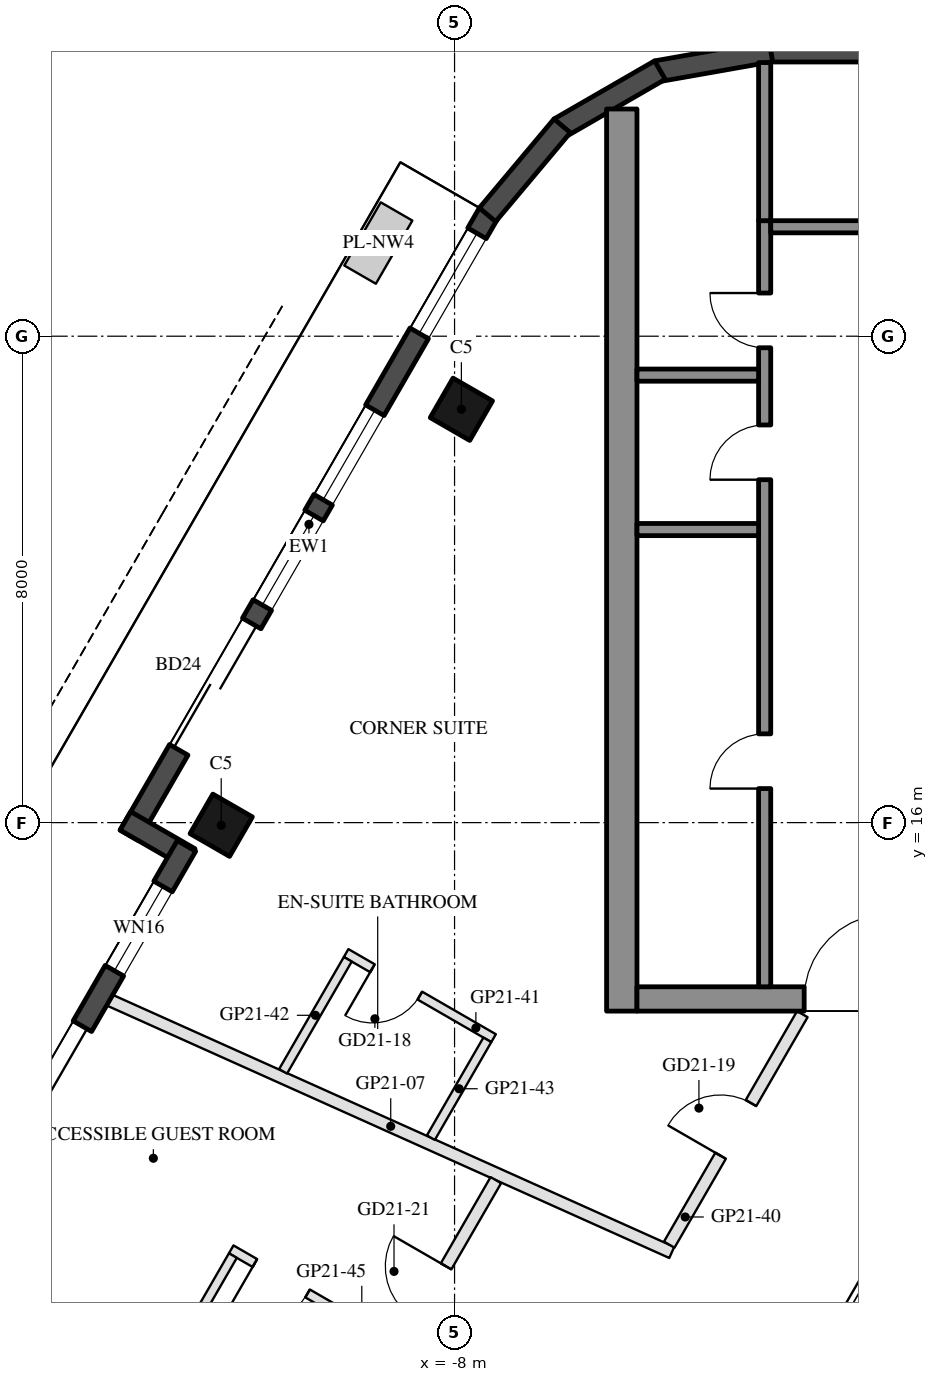
"""IFC4 building model, lengths in metres.
Left out: names, types, materials, properties, quantities, classifications, styles, units other than length and angle.
Written with IfcOpenShell. Run it as: python <this file> out.ifc"""

import sys

from ifc_helpers import new_model, si_unit, direction, frame, frame_2d, origin, origin_2d, place, context, subcontext, project, spatial, rectangle, hollow_rectangle, extrude, element, fill, save


model = new_model("IFC4")
c1 = context("Model", 3, precision=1e-05, world=origin(), true_north=direction((0.0, 1.0)))
c2 = subcontext(c1, "Body", "Model", "MODEL_VIEW")
j1 = project(units=[si_unit("LENGTHUNIT", "METRE"), si_unit("PLANEANGLEUNIT", "RADIAN")], contexts=[c1])
p1 = place(None, origin())
s1 = spatial("IfcSite", under=j1, at=p1, CompositionType="ELEMENT")
p2 = place(p1, origin())
s2 = spatial("IfcBuilding", under=s1, at=p2, CompositionType="ELEMENT")
p3 = place(p2, frame((0.0, 0.0, 220.6)))
s3 = spatial("IfcBuildingStorey", under=s2, at=p3, CompositionType="ELEMENT", Elevation=220.6)
for number, where, z_axis, x_axis in (
    (1, (-7.888, 22.798, 0.0), (0.0, 0.0, 1.0), (0.5, 0.866, 0.0)),
    (2, (-11.838, 15.957, 0.0), (0.0, 0.0, 1.0), (0.5, 0.866, 0.0)),
):
    element("IfcColumn", number, at=place(p3, frame(where, z_axis=z_axis, x_axis=x_axis)), inside=s3, PredefinedType="COLUMN", context=c2, shape_type="SweptSolid", body=[
        extrude(hollow_rectangle(XDim=0.75, YDim=0.75, WallThickness=0.035, at=origin_2d()), origin(), (0.0, 0.0, 1.0), 3.7),
    ])
p4 = place(p3, frame((-7.441, 26.022, 0.0), z_axis=(0.0, 0.0, 1.0), x_axis=(-0.499992533062, -0.86602971478, 0.0)))
e3 = element("IfcWall", 3, at=p4, inside=s3, PredefinedType="SOLIDWALL", context=c2, shape_type="SweptSolid", body=[
    extrude(rectangle(XDim=11.816, YDim=0.35, at=frame_2d((5.908, 0.0))), origin(), (0.0, 0.0, 1.0), 3.55),
])
p5 = place(p4, frame((0.381, 0.0, 0.3)))
e4 = element("IfcOpeningElement", 4, at=p5, cuts=e3, PredefinedType="OPENING", context=c2, shape_type="SweptSolid", body=[
    extrude(rectangle(XDim=1.9, YDim=2.65, at=frame_2d((0.95, 1.325))), frame((0.0, 0.185, 0.0), z_axis=(0.0, -1.0, 0.0), x_axis=(1.0, 0.0, 0.0)), (0.0, 0.0, 1.0), 0.37),
])
p6 = place(p4, frame((7.791, 0.0, 0.0)))
e5 = element("IfcOpeningElement", 5, at=p6, cuts=e3, PredefinedType="OPENING", context=c2, shape_type="SweptSolid", body=[
    extrude(rectangle(XDim=2.4, YDim=2.4, at=frame_2d((1.2, 1.2))), frame((0.0, 0.185, 0.0), z_axis=(0.0, -1.0, 0.0), x_axis=(1.0, 0.0, 0.0)), (0.0, 0.0, 1.0), 0.37),
])
p7 = place(p4, frame((3.741, 0.0, 0.3)))
e6 = element("IfcOpeningElement", 6, at=p7, cuts=e3, PredefinedType="OPENING", context=c2, shape_type="SweptSolid", body=[
    extrude(rectangle(XDim=1.7, YDim=2.65, at=frame_2d((0.85, 1.325))), frame((0.0, 0.185, 0.0), z_axis=(0.0, -1.0, 0.0), x_axis=(1.0, 0.0, 0.0)), (0.0, 0.0, 1.0), 0.37),
])
p8 = place(p4, frame((5.741, 0.0, 0.3)))
e7 = element("IfcOpeningElement", 7, at=p8, cuts=e3, PredefinedType="OPENING", context=c2, shape_type="SweptSolid", body=[
    extrude(rectangle(XDim=1.7, YDim=2.65, at=frame_2d((0.85, 1.325))), frame((0.0, 0.185, 0.0), z_axis=(0.0, -1.0, 0.0), x_axis=(1.0, 0.0, 0.0)), (0.0, 0.0, 1.0), 0.37),
])
p9 = place(p3, frame((-13.413, 16.029, 0.0), z_axis=(0.0, 0.0, 1.0), x_axis=(0.866005645448, -0.500034220881, 0.0)))
e8 = element("IfcWall", 8, at=p9, inside=s3, PredefinedType="SOLIDWALL", context=c2, shape_type="SweptSolid", body=[
    extrude(rectangle(XDim=1.22, YDim=0.35, at=frame_2d((0.61, 0.0))), origin(), (0.0, 0.0, 1.0), 3.55),
])
p10 = place(p3, frame((-12.409, 15.617, 0.0), z_axis=(0.0, 0.0, 1.0), x_axis=(-0.500003597184, -0.866023326939, 0.0)))
e9 = element("IfcWall", 9, at=p10, inside=s3, PredefinedType="SOLIDWALL", context=c2, shape_type="SweptSolid", body=[
    extrude(rectangle(XDim=6.74, YDim=0.35, at=frame_2d((3.37, 0.0))), origin(), (0.0, 0.0, 1.0), 3.55),
])
p11 = place(p10, frame((0.77, 0.0, 0.3)))
e10 = element("IfcOpeningElement", 10, at=p11, cuts=e9, PredefinedType="OPENING", context=c2, shape_type="SweptSolid", body=[
    extrude(rectangle(XDim=1.6, YDim=2.65, at=frame_2d((0.8, 1.325))), frame((0.0, 0.185, 0.0), z_axis=(0.0, -1.0, 0.0), x_axis=(1.0, 0.0, 0.0)), (0.0, 0.0, 1.0), 0.37),
])
p12 = place(p10, frame((3.424, 0.0, 0.0)))
e11 = element("IfcOpeningElement", 11, at=p12, cuts=e9, PredefinedType="OPENING", context=c2, shape_type="SweptSolid", body=[
    extrude(rectangle(XDim=2.4, YDim=2.4, at=frame_2d((1.2, 1.2))), frame((0.0, 0.185, 0.0), z_axis=(0.0, -1.0, 0.0), x_axis=(1.0, 0.0, 0.0)), (0.0, 0.0, 1.0), 0.37),
])
p13 = place(p3, frame((2.829, 28.685, 0.0), z_axis=(0.0, 0.0, 1.0), x_axis=(-1.0, 0.0, 0.0)))
e12 = element("IfcWall", 12, at=p13, inside=s3, PredefinedType="SOLIDWALL", context=c2, shape_type="SweptSolid", body=[
    extrude(rectangle(XDim=5.658, YDim=0.35, at=frame_2d((2.829, 0.0))), origin(), (0.0, 0.0, 1.0), 3.55),
])
for number, where, z_axis, x_axis in (
    (13, (-2.799, 28.688, 0.0), (0.0, 0.0, 1.0), (-0.985, -0.174, 0.0)),
    (14, (-4.623, 28.377, 0.0), (0.0, 0.0, 1.0), (-0.866, -0.5, 0.0)),
):
    element("IfcWall", number, at=place(p3, frame(where, z_axis=z_axis, x_axis=x_axis)), inside=s3, PredefinedType="SOLIDWALL", context=c2, shape_type="SweptSolid", body=[
        extrude(rectangle(XDim=1.91, YDim=0.35, at=frame_2d((0.955, 0.0))), origin(), (0.0, 0.0, 1.0), 3.55),
    ])
p14 = place(p3, frame((-6.23, 27.461, 0.0), z_axis=(0.0, 0.0, 1.0), x_axis=(-0.642808304945, -0.766027077259, 0.0)))
e15 = element("IfcWall", 15, at=p14, inside=s3, PredefinedType="SOLIDWALL", context=c2, shape_type="SweptSolid", body=[
    extrude(rectangle(XDim=1.91, YDim=0.35, at=frame_2d((0.955, 0.0))), origin(), (0.0, 0.0, 1.0), 3.55),
])
p15 = place(p3, frame((-5.25, 12.9, 0.0), z_axis=(0.0, 0.0, 1.0), x_axis=(0.0, 1.0, 0.0)))
e16 = element("IfcWall", 16, at=p15, inside=s3, PredefinedType="SHEAR", context=c2, shape_type="SweptSolid", body=[
    extrude(rectangle(XDim=14.837, YDim=0.5, at=frame_2d((7.418, 0.0))), origin(), (0.0, 0.0, 1.0), 3.5),
])
p16 = place(p3, frame((5.0, 13.1, 0.0), z_axis=(0.0, 0.0, 1.0), x_axis=(-1.0, 0.0, 0.0)))
e17 = element("IfcWall", 17, at=p16, inside=s3, PredefinedType="SHEAR", context=c2, shape_type="SweptSolid", body=[
    extrude(rectangle(XDim=10.0, YDim=0.4, at=frame_2d((5.0, 0.0))), origin(), (0.0, 0.0, 1.0), 3.5),
])
p17 = place(p16, frame((3.55, 0.0, 0.0)))
e18 = element("IfcOpeningElement", 18, at=p17, cuts=e17, PredefinedType="OPENING", context=c2, shape_type="SweptSolid", body=[
    extrude(rectangle(XDim=1.1, YDim=2.1, at=frame_2d((0.55, 1.05))), frame((0.0, 0.21, 0.0), z_axis=(0.0, -1.0, 0.0), x_axis=(1.0, 0.0, 0.0)), (0.0, 0.0, 1.0), 0.42),
])
p18 = place(p16, frame((5.85, 0.0, 0.0)))
e19 = element("IfcOpeningElement", 19, at=p18, cuts=e17, PredefinedType="OPENING", context=c2, shape_type="SweptSolid", body=[
    extrude(rectangle(XDim=1.4, YDim=2.1, at=frame_2d((0.7, 1.05))), frame((0.0, 0.21, 0.0), z_axis=(0.0, -1.0, 0.0), x_axis=(1.0, 0.0, 0.0)), (0.0, 0.0, 1.0), 0.42),
])
p19 = place(p3, frame((-2.9, 13.3, 0.0), z_axis=(0.0, 0.0, 1.0), x_axis=(0.0, 1.0, 0.0)))
e20 = element("IfcWall", 20, at=p19, inside=s3, PredefinedType="SHEAR", context=c2, shape_type="SweptSolid", body=[
    extrude(rectangle(XDim=12.6, YDim=0.2, at=frame_2d((6.3, 0.0))), origin(), (0.0, 0.0, 1.0), 3.5),
])
p20 = place(p19, frame((3.26, 0.0, 0.0)))
e21 = element("IfcOpeningElement", 21, at=p20, cuts=e20, PredefinedType="OPENING", context=c2, shape_type="SweptSolid", body=[
    extrude(rectangle(XDim=0.9, YDim=2.1, at=frame_2d((0.45, 1.05))), frame((0.0, 0.11, 0.0), z_axis=(0.0, -1.0, 0.0), x_axis=(1.0, 0.0, 0.0)), (0.0, 0.0, 1.0), 0.22),
])
p21 = place(p19, frame((8.34, 0.0, 0.0)))
e22 = element("IfcOpeningElement", 22, at=p21, cuts=e20, PredefinedType="OPENING", context=c2, shape_type="SweptSolid", body=[
    extrude(rectangle(XDim=0.9, YDim=2.1, at=frame_2d((0.45, 1.05))), frame((0.0, 0.11, 0.0), z_axis=(0.0, -1.0, 0.0), x_axis=(1.0, 0.0, 0.0)), (0.0, 0.0, 1.0), 0.22),
])
p22 = place(p19, frame((10.51, 0.0, 0.0)))
e23 = element("IfcOpeningElement", 23, at=p22, cuts=e20, PredefinedType="OPENING", context=c2, shape_type="SweptSolid", body=[
    extrude(rectangle(XDim=0.9, YDim=2.1, at=frame_2d((0.45, 1.05))), frame((0.0, 0.11, 0.0), z_axis=(0.0, -1.0, 0.0), x_axis=(1.0, 0.0, 0.0)), (0.0, 0.0, 1.0), 0.22),
])
p23 = place(p3, frame((-0.4, 25.8, 0.0), z_axis=(0.0, 0.0, 1.0), x_axis=(-1.0, 0.0, 0.0)))
e24 = element("IfcWall", 24, at=p23, inside=s3, PredefinedType="SHEAR", context=c2, shape_type="SweptSolid", body=[
    extrude(rectangle(XDim=2.4, YDim=0.2, at=frame_2d((1.2, 0.0))), origin(), (0.0, 0.0, 1.0), 3.5),
])
for number, where, z_axis, x_axis in (
    (25, (-3.0, 20.82, 0.0), (0.0, 0.0, 1.0), (-1.0, 0.0, 0.0)),
    (26, (-3.0, 23.36, 0.0), (0.0, 0.0, 1.0), (-1.0, 0.0, 0.0)),
):
    element("IfcWall", number, at=place(p3, frame(where, z_axis=z_axis, x_axis=x_axis)), inside=s3, PredefinedType="SHEAR", context=c2, shape_type="SweptSolid", body=[
        extrude(rectangle(XDim=2.0, YDim=0.2, at=frame_2d((1.0, 0.0))), origin(), (0.0, 0.0, 1.0), 3.5),
    ])
p24 = place(p3, frame((-2.9, 25.9, 0.0), z_axis=(0.0, 0.0, 1.0), x_axis=(0.0, 1.0, 0.0)))
e27 = element("IfcWall", 27, at=p24, inside=s3, PredefinedType="SHEAR", context=c2, shape_type="SweptSolid", body=[
    extrude(rectangle(XDim=2.6, YDim=0.2, at=frame_2d((1.3, 0.0))), origin(), (0.0, 0.0, 1.0), 3.5),
])
p25 = place(p3, frame((-13.672, 13.08, 0.0), z_axis=(0.0, 0.0, 1.0), x_axis=(0.912311972773, -0.409495866077, 0.0)))
e28 = element("IfcWall", 28, at=p25, inside=s3, PredefinedType="PARTITIONING", context=c2, shape_type="SweptSolid", body=[
    extrude(rectangle(XDim=10.132, YDim=0.2, at=frame_2d((5.066, 0.0))), origin(), (0.0, 0.0, 1.0), 3.06),
])
p26 = place(p3, frame((-17.347, 8.514, 0.0), z_axis=(0.0, 0.0, 1.0), x_axis=(0.879604495132, -0.475705720109, 0.0)))
e29 = element("IfcWall", 29, at=p26, inside=s3, PredefinedType="PARTITIONING", context=c2, shape_type="SweptSolid", body=[
    extrude(rectangle(XDim=7.983, YDim=0.2, at=frame_2d((3.992, 0.0))), origin(), (0.0, 0.0, 1.0), 3.06),
])
p27 = place(p3, frame((-4.469, 9.059, 0.0), z_axis=(0.0, 0.0, 1.0), x_axis=(0.499996027077, 0.86602769754, 0.0)))
e30 = element("IfcWall", 30, at=p27, inside=s3, PredefinedType="PARTITIONING", context=c2, shape_type="SweptSolid", body=[
    extrude(rectangle(XDim=4.377, YDim=0.2, at=frame_2d((2.189, 0.0))), origin(), (0.0, 0.0, 1.0), 2.95),
])
p28 = place(p27, frame((1.689, 0.0, 0.0)))
e31 = element("IfcOpeningElement", 31, at=p28, cuts=e30, PredefinedType="OPENING", context=c2, shape_type="SweptSolid", body=[
    extrude(rectangle(XDim=1.0, YDim=2.1, at=frame_2d((0.5, 1.05))), frame((0.0, 0.11, 0.0), z_axis=(0.0, -1.0, 0.0), x_axis=(1.0, 0.0, 0.0)), (0.0, 0.0, 1.0), 0.22),
])
p29 = place(p3, frame((-7.358, 12.455, 0.0), z_axis=(0.0, 0.0, 1.0), x_axis=(-0.866034573852, 0.49998411664, 0.0)))
e32 = element("IfcWall", 32, at=p29, inside=s3, PredefinedType="PARTITIONING", context=c2, shape_type="SweptSolid", body=[
    extrude(rectangle(XDim=2.8, YDim=0.15, at=frame_2d((1.4, 0.0))), origin(), (0.0, 0.0, 1.0), 3.55),
])
p30 = place(p29, frame((1.4, 0.0, 0.0)))
e33 = element("IfcOpeningElement", 33, at=p30, cuts=e32, PredefinedType="OPENING", context=c2, shape_type="SweptSolid", body=[
    extrude(rectangle(XDim=0.9, YDim=2.1, at=frame_2d((0.45, 1.05))), frame((0.0, 0.085, 0.0), z_axis=(0.0, -1.0, 0.0), x_axis=(1.0, 0.0, 0.0)), (0.0, 0.0, 1.0), 0.17),
])
p31 = place(p3, frame((-9.756, 13.752, 0.0), z_axis=(0.0, 0.0, 1.0), x_axis=(-0.50001378257, -0.866017446268, 0.0)))
e34 = element("IfcWall", 34, at=p31, inside=s3, PredefinedType="PARTITIONING", context=c2, shape_type="SweptSolid", body=[
    extrude(rectangle(XDim=2.128, YDim=0.15, at=frame_2d((1.064, 0.0))), origin(), (0.0, 0.0, 1.0), 3.55),
])
p32 = place(p3, frame((-7.461, 12.427, 0.0), z_axis=(0.0, 0.0, 1.0), x_axis=(-0.500025795397, -0.866010510293, 0.0)))
e35 = element("IfcWall", 35, at=p32, inside=s3, PredefinedType="PARTITIONING", context=c2, shape_type="SweptSolid", body=[
    extrude(rectangle(XDim=1.858, YDim=0.15, at=frame_2d((0.929, 0.0))), origin(), (0.0, 0.0, 1.0), 3.55),
])
p33 = place(p3, frame((-10.363, 4.851, 0.0), z_axis=(0.0, 0.0, 1.0), x_axis=(0.50000147882, 0.866024549986, 0.0)))
e36 = element("IfcWall", 36, at=p33, inside=s3, PredefinedType="PARTITIONING", context=c2, shape_type="SweptSolid", body=[
    extrude(rectangle(XDim=6.084, YDim=0.2, at=frame_2d((3.042, 0.0))), origin(), (0.0, 0.0, 1.0), 2.95),
])
p34 = place(p33, frame((3.447, 0.0, 0.0)))
e37 = element("IfcOpeningElement", 37, at=p34, cuts=e36, PredefinedType="OPENING", context=c2, shape_type="SweptSolid", body=[
    extrude(rectangle(XDim=1.0, YDim=2.1, at=frame_2d((0.5, 1.05))), frame((0.0, 0.11, 0.0), z_axis=(0.0, -1.0, 0.0), x_axis=(1.0, 0.0, 0.0)), (0.0, 0.0, 1.0), 0.22),
])
p35 = place(p3, frame((-8.989, 7.431, 0.0), z_axis=(0.0, 0.0, 1.0), x_axis=(-0.86600983753, 0.500026960575, 0.0)))
e38 = element("IfcWall", 38, at=p35, inside=s3, PredefinedType="PARTITIONING", context=c2, shape_type="SweptSolid", body=[
    extrude(rectangle(XDim=3.1, YDim=0.15, at=frame_2d((1.55, 0.0))), origin(), (0.0, 0.0, 1.0), 3.55),
])
p36 = place(p35, frame((1.65, 0.0, 0.0)))
e39 = element("IfcOpeningElement", 39, at=p36, cuts=e38, PredefinedType="OPENING", context=c2, shape_type="SweptSolid", body=[
    extrude(rectangle(XDim=1.0, YDim=2.1, at=frame_2d((0.5, 1.05))), frame((0.0, 0.085, 0.0), z_axis=(0.0, -1.0, 0.0), x_axis=(1.0, 0.0, 0.0)), (0.0, 0.0, 1.0), 0.17),
])
p37 = place(p3, frame((-11.646, 8.879, 0.0), z_axis=(0.0, 0.0, 1.0), x_axis=(-0.499996155683, -0.86602762329, 0.0)))
e40 = element("IfcWall", 40, at=p37, inside=s3, PredefinedType="PARTITIONING", context=c2, shape_type="SweptSolid", body=[
    extrude(rectangle(XDim=2.934, YDim=0.15, at=frame_2d((1.467, 0.0))), origin(), (0.0, 0.0, 1.0), 2.95),
])
p38 = place(p5, origin())
e41 = element("IfcWindow", 41, at=p38, inside=s3, PartitioningType="SINGLE_PANEL", PredefinedType="WINDOW", context=c2, shape_type="SweptSolid", body=[
    extrude(rectangle(XDim=1.9, YDim=2.65, at=frame_2d((0.95, 1.325))), frame((0.0, 0.03, 0.0), z_axis=(0.0, -1.0, 0.0), x_axis=(1.0, 0.0, 0.0)), (0.0, 0.0, 1.0), 0.06),
])
fill(e4, e41)
p39 = place(p6, frame((2.4, 0.0, 0.0), z_axis=(0.0, 0.0, 1.0), x_axis=(-1.0, 0.0, 0.0)))
e42 = element("IfcDoor", 42, at=p39, inside=s3, OperationType="SLIDING_TO_LEFT", PredefinedType="DOOR", context=c2, shape_type="SweptSolid", body=[
    extrude(rectangle(XDim=2.4, YDim=2.4, at=frame_2d((1.2, 1.2))), frame((0.0, 0.025, 0.0), z_axis=(0.0, -1.0, 0.0), x_axis=(1.0, 0.0, 0.0)), (0.0, 0.0, 1.0), 0.05),
])
fill(e5, e42)
p40 = place(p7, origin())
e43 = element("IfcWindow", 43, at=p40, inside=s3, PartitioningType="SINGLE_PANEL", PredefinedType="WINDOW", context=c2, shape_type="SweptSolid", body=[
    extrude(rectangle(XDim=1.7, YDim=2.65, at=frame_2d((0.85, 1.325))), frame((0.0, 0.03, 0.0), z_axis=(0.0, -1.0, 0.0), x_axis=(1.0, 0.0, 0.0)), (0.0, 0.0, 1.0), 0.06),
])
fill(e6, e43)
p41 = place(p8, origin())
e44 = element("IfcWindow", 44, at=p41, inside=s3, PartitioningType="SINGLE_PANEL", PredefinedType="WINDOW", context=c2, shape_type="SweptSolid", body=[
    extrude(rectangle(XDim=1.7, YDim=2.65, at=frame_2d((0.85, 1.325))), frame((0.0, 0.03, 0.0), z_axis=(0.0, -1.0, 0.0), x_axis=(1.0, 0.0, 0.0)), (0.0, 0.0, 1.0), 0.06),
])
fill(e7, e44)
p42 = place(p11, origin())
e45 = element("IfcWindow", 45, at=p42, inside=s3, PartitioningType="SINGLE_PANEL", PredefinedType="WINDOW", context=c2, shape_type="SweptSolid", body=[
    extrude(rectangle(XDim=1.6, YDim=2.65, at=frame_2d((0.8, 1.325))), frame((0.0, 0.03, 0.0), z_axis=(0.0, -1.0, 0.0), x_axis=(1.0, 0.0, 0.0)), (0.0, 0.0, 1.0), 0.06),
])
fill(e10, e45)
p43 = place(p12, frame((2.4, 0.0, 0.0), z_axis=(0.0, 0.0, 1.0), x_axis=(-1.0, 0.0, 0.0)))
e46 = element("IfcDoor", 46, at=p43, inside=s3, OperationType="SLIDING_TO_LEFT", PredefinedType="DOOR", context=c2, shape_type="SweptSolid", body=[
    extrude(rectangle(XDim=2.4, YDim=2.4, at=frame_2d((1.2, 1.2))), frame((0.0, 0.025, 0.0), z_axis=(0.0, -1.0, 0.0), x_axis=(1.0, 0.0, 0.0)), (0.0, 0.0, 1.0), 0.05),
])
fill(e11, e46)
p44 = place(p20, origin())
e47 = element("IfcDoor", 47, at=p44, inside=s3, OperationType="SINGLE_SWING_LEFT", PredefinedType="DOOR", context=c2, shape_type="SweptSolid", body=[
    extrude(rectangle(XDim=0.9, YDim=2.1, at=frame_2d((0.45, 1.05))), frame((0.0, 0.025, 0.0), z_axis=(0.0, -1.0, 0.0), x_axis=(1.0, 0.0, 0.0)), (0.0, 0.0, 1.0), 0.05),
])
fill(e21, e47)
p45 = place(p21, origin())
e48 = element("IfcDoor", 48, at=p45, inside=s3, OperationType="SINGLE_SWING_LEFT", PredefinedType="DOOR", context=c2, shape_type="SweptSolid", body=[
    extrude(rectangle(XDim=0.9, YDim=2.1, at=frame_2d((0.45, 1.05))), frame((0.0, 0.025, 0.0), z_axis=(0.0, -1.0, 0.0), x_axis=(1.0, 0.0, 0.0)), (0.0, 0.0, 1.0), 0.05),
])
fill(e22, e48)
p46 = place(p22, origin())
e49 = element("IfcDoor", 49, at=p46, inside=s3, OperationType="SINGLE_SWING_RIGHT", PredefinedType="DOOR", context=c2, shape_type="SweptSolid", body=[
    extrude(rectangle(XDim=0.9, YDim=2.1, at=frame_2d((0.45, 1.05))), frame((0.0, 0.025, 0.0), z_axis=(0.0, -1.0, 0.0), x_axis=(1.0, 0.0, 0.0)), (0.0, 0.0, 1.0), 0.05),
])
fill(e23, e49)
p47 = place(p18, frame((1.4, 0.0, 0.0), z_axis=(0.0, 0.0, 1.0), x_axis=(-1.0, 0.0, 0.0)))
e50 = element("IfcDoor", 50, at=p47, inside=s3, OperationType="DOUBLE_DOOR_SINGLE_SWING", PredefinedType="DOOR", context=c2, shape_type="SweptSolid", body=[
    extrude(rectangle(XDim=1.4, YDim=2.1, at=frame_2d((0.7, 1.05))), frame((0.0, 0.025, 0.0), z_axis=(0.0, -1.0, 0.0), x_axis=(1.0, 0.0, 0.0)), (0.0, 0.0, 1.0), 0.05),
])
fill(e19, e50)
p48 = place(p30, origin())
e51 = element("IfcDoor", 51, at=p48, inside=s3, OperationType="SINGLE_SWING_RIGHT", PredefinedType="DOOR", context=c2, shape_type="SweptSolid", body=[
    extrude(rectangle(XDim=0.9, YDim=2.1, at=frame_2d((0.45, 1.05))), frame((0.0, 0.025, 0.0), z_axis=(0.0, -1.0, 0.0), x_axis=(1.0, 0.0, 0.0)), (0.0, 0.0, 1.0), 0.05),
])
fill(e33, e51)
p49 = place(p28, origin())
e52 = element("IfcDoor", 52, at=p49, inside=s3, OperationType="SINGLE_SWING_LEFT", PredefinedType="DOOR", context=c2, shape_type="SweptSolid", body=[
    extrude(rectangle(XDim=1.0, YDim=2.1, at=frame_2d((0.5, 1.05))), frame((0.0, 0.025, 0.0), z_axis=(0.0, -1.0, 0.0), x_axis=(1.0, 0.0, 0.0)), (0.0, 0.0, 1.0), 0.05),
])
fill(e31, e52)
p50 = place(p36, origin())
e53 = element("IfcDoor", 53, at=p50, inside=s3, OperationType="SINGLE_SWING_RIGHT", PredefinedType="DOOR", context=c2, shape_type="SweptSolid", body=[
    extrude(rectangle(XDim=1.0, YDim=2.1, at=frame_2d((0.5, 1.05))), frame((0.0, 0.025, 0.0), z_axis=(0.0, -1.0, 0.0), x_axis=(1.0, 0.0, 0.0)), (0.0, 0.0, 1.0), 0.05),
])
fill(e39, e53)
p51 = place(p34, origin())
e54 = element("IfcDoor", 54, at=p51, inside=s3, OperationType="SINGLE_SWING_RIGHT", PredefinedType="DOOR", context=c2, shape_type="SweptSolid", body=[
    extrude(rectangle(XDim=1.0, YDim=2.1, at=frame_2d((0.5, 1.05))), frame((0.0, 0.025, 0.0), z_axis=(0.0, -1.0, 0.0), x_axis=(1.0, 0.0, 0.0)), (0.0, 0.0, 1.0), 0.05),
])
fill(e37, e54)
save(model, sys.argv[1])
